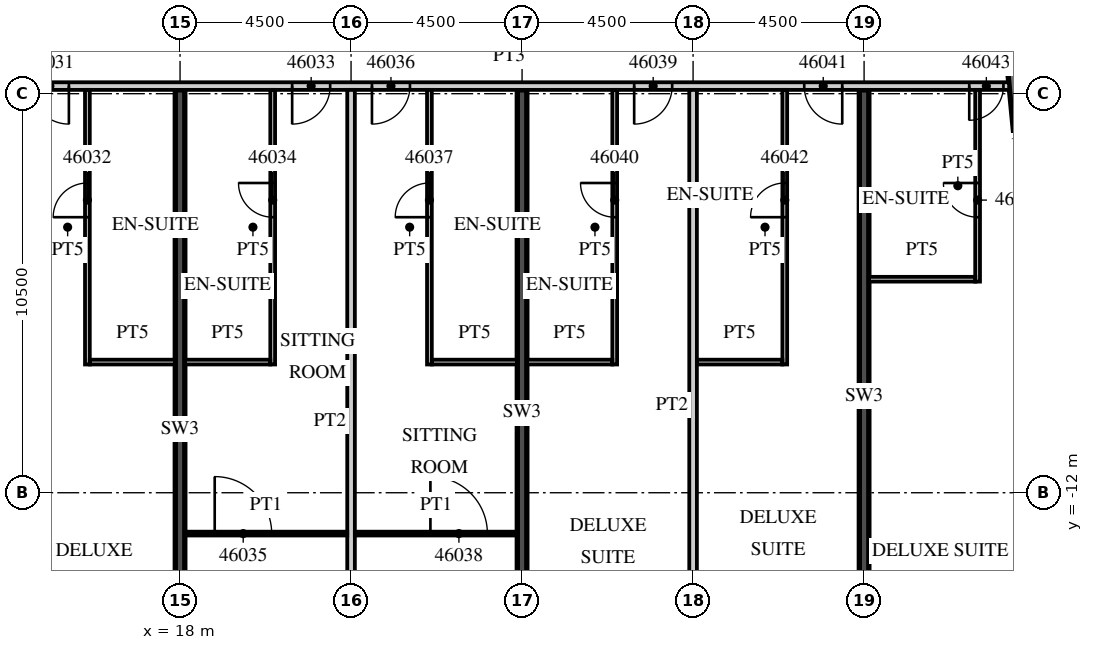
"""IFC4 building model, lengths in metres.
Left out: names, types, materials, properties, quantities, classifications, styles, units other than length and angle.
Written with IfcOpenShell. Run it as: python <this file> out.ifc"""

import sys

from ifc_helpers import new_model, si_unit, direction, frame, frame_2d, origin, place, context, subcontext, project, spatial, rectangle, extrude, element, fill, save


model = new_model("IFC4")
c1 = context("Model", 3, precision=1e-05, world=origin(), true_north=direction((0.0, 1.0)))
c2 = subcontext(c1, "Body", "Model", "MODEL_VIEW")
j1 = project(units=[si_unit("LENGTHUNIT", "METRE"), si_unit("PLANEANGLEUNIT", "RADIAN")], contexts=[c1])
p1 = place(None, origin())
s1 = spatial("IfcSite", under=j1, at=p1, CompositionType="ELEMENT")
p2 = place(p1, origin())
s2 = spatial("IfcBuilding", under=s1, at=p2, CompositionType="ELEMENT")
p3 = place(p2, frame((0.0, 0.0, 193.3)))
s3 = spatial("IfcBuildingStorey", under=s2, at=p3, CompositionType="ELEMENT", Elevation=193.3)
p4 = place(p3, frame((18.0, -19.245, 0.0), z_axis=(0.0, 0.0, 1.0), x_axis=(0.0, 1.0, 0.0)))
e1 = element("IfcWall", 1, at=p4, inside=s3, PredefinedType="SHEAR", context=c2, shape_type="SweptSolid", body=[
    extrude(rectangle(XDim=17.845, YDim=0.25, at=frame_2d((8.923, 0.0))), origin(), (0.0, 0.0, 1.0), 3.3),
])
p5 = place(p3, frame((27.0, -18.379, 0.0), z_axis=(0.0, 0.0, 1.0), x_axis=(0.0, 1.0, 0.0)))
e2 = element("IfcWall", 2, at=p5, inside=s3, PredefinedType="SHEAR", context=c2, shape_type="SweptSolid", body=[
    extrude(rectangle(XDim=16.979, YDim=0.25, at=frame_2d((8.489, 0.0))), origin(), (0.0, 0.0, 1.0), 3.3),
])
p6 = place(p3, frame((36.0, -17.512, 0.0), z_axis=(0.0, 0.0, 1.0), x_axis=(0.0, 1.0, 0.0)))
e3 = element("IfcWall", 3, at=p6, inside=s3, PredefinedType="SHEAR", context=c2, shape_type="SweptSolid", body=[
    extrude(rectangle(XDim=16.112, YDim=0.25, at=frame_2d((8.056, 0.0))), origin(), (0.0, 0.0, 1.0), 3.3),
])
p7 = place(p3, frame((41.214, -13.466, 0.0), z_axis=(0.0, 0.0, 1.0), x_axis=(-0.095847314626, 0.995396047952, 0.0)))
e4 = element("IfcWall", 4, at=p7, inside=s3, PredefinedType="SOLIDWALL", context=c2, shape_type="SweptSolid", body=[
    extrude(rectangle(XDim=34.0, YDim=0.45, at=frame_2d((17.0, 0.0))), origin(), (0.0, 0.0, 1.0), 3.02),
])
p8 = place(p7, frame((3.869, 0.0, 0.45)))
e5 = element("IfcOpeningElement", 5, at=p8, cuts=e4, PredefinedType="OPENING", context=c2, shape_type="SweptSolid", body=[
    extrude(rectangle(XDim=3.3, YDim=2.25, at=frame_2d((1.65, 1.125))), frame((0.0, 0.235, 0.0), z_axis=(0.0, -1.0, 0.0), x_axis=(1.0, 0.0, 0.0)), (0.0, 0.0, 1.0), 0.47),
])
p9 = place(p7, frame((8.39, 0.0, 0.45)))
e6 = element("IfcOpeningElement", 6, at=p9, cuts=e4, PredefinedType="OPENING", context=c2, shape_type="SweptSolid", body=[
    extrude(rectangle(XDim=3.3, YDim=2.25, at=frame_2d((1.65, 1.125))), frame((0.0, 0.235, 0.0), z_axis=(0.0, -1.0, 0.0), x_axis=(1.0, 0.0, 0.0)), (0.0, 0.0, 1.0), 0.47),
])
p10 = place(p3, frame((13.5, -1.3, 0.0), z_axis=(0.0, 0.0, 1.0), x_axis=(1.0, 0.0, 0.0)))
e7 = element("IfcWall", 7, at=p10, inside=s3, PredefinedType="PARTITIONING", context=c2, shape_type="SweptSolid", body=[
    extrude(rectangle(XDim=26.317, YDim=0.2, at=frame_2d((13.158, 0.0))), origin(), (0.0, 0.0, 1.0), 3.02),
])
p11 = place(p10, frame((0.575, 0.0, 0.0)))
e8 = element("IfcOpeningElement", 8, at=p11, cuts=e7, PredefinedType="OPENING", context=c2, shape_type="SweptSolid", body=[
    extrude(rectangle(XDim=1.0, YDim=2.1, at=frame_2d((0.5, 1.05))), frame((0.0, 0.11, 0.0), z_axis=(0.0, -1.0, 0.0), x_axis=(1.0, 0.0, 0.0)), (0.0, 0.0, 1.0), 0.22),
])
p12 = place(p10, frame((7.45, 0.0, 0.0)))
e9 = element("IfcOpeningElement", 9, at=p12, cuts=e7, PredefinedType="OPENING", context=c2, shape_type="SweptSolid", body=[
    extrude(rectangle(XDim=1.0, YDim=2.1, at=frame_2d((0.5, 1.05))), frame((0.0, 0.11, 0.0), z_axis=(0.0, -1.0, 0.0), x_axis=(1.0, 0.0, 0.0)), (0.0, 0.0, 1.0), 0.22),
])
p13 = place(p10, frame((9.55, 0.0, 0.0)))
e10 = element("IfcOpeningElement", 10, at=p13, cuts=e7, PredefinedType="OPENING", context=c2, shape_type="SweptSolid", body=[
    extrude(rectangle(XDim=1.0, YDim=2.1, at=frame_2d((0.5, 1.05))), frame((0.0, 0.11, 0.0), z_axis=(0.0, -1.0, 0.0), x_axis=(1.0, 0.0, 0.0)), (0.0, 0.0, 1.0), 0.22),
])
p14 = place(p10, frame((16.45, 0.0, 0.0)))
e11 = element("IfcOpeningElement", 11, at=p14, cuts=e7, PredefinedType="OPENING", context=c2, shape_type="SweptSolid", body=[
    extrude(rectangle(XDim=1.0, YDim=2.1, at=frame_2d((0.5, 1.05))), frame((0.0, 0.11, 0.0), z_axis=(0.0, -1.0, 0.0), x_axis=(1.0, 0.0, 0.0)), (0.0, 0.0, 1.0), 0.22),
])
p15 = place(p10, frame((20.925, 0.0, 0.0)))
e12 = element("IfcOpeningElement", 12, at=p15, cuts=e7, PredefinedType="OPENING", context=c2, shape_type="SweptSolid", body=[
    extrude(rectangle(XDim=1.0, YDim=2.1, at=frame_2d((0.5, 1.05))), frame((0.0, 0.11, 0.0), z_axis=(0.0, -1.0, 0.0), x_axis=(1.0, 0.0, 0.0)), (0.0, 0.0, 1.0), 0.22),
])
p16 = place(p10, frame((25.267, 0.0, 0.0)))
e13 = element("IfcOpeningElement", 13, at=p16, cuts=e7, PredefinedType="OPENING", context=c2, shape_type="SweptSolid", body=[
    extrude(rectangle(XDim=0.9, YDim=2.1, at=frame_2d((0.45, 1.05))), frame((0.0, 0.11, 0.0), z_axis=(0.0, -1.0, 0.0), x_axis=(1.0, 0.0, 0.0)), (0.0, 0.0, 1.0), 0.22),
])
p17 = place(p3, frame((15.562, -8.625, 0.0), z_axis=(0.0, 0.0, 1.0), x_axis=(0.0, 1.0, 0.0)))
e14 = element("IfcWall", 14, at=p17, inside=s3, PredefinedType="PARTITIONING", context=c2, shape_type="SweptSolid", body=[
    extrude(rectangle(XDim=7.225, YDim=0.125, at=frame_2d((3.613, 0.0))), origin(), (0.0, 0.0, 1.0), 3.02),
])
p18 = place(p17, frame((3.875, 0.0, 0.0)))
e15 = element("IfcOpeningElement", 15, at=p18, cuts=e14, PredefinedType="OPENING", context=c2, shape_type="SweptSolid", body=[
    extrude(rectangle(XDim=0.9, YDim=2.1, at=frame_2d((0.45, 1.05))), frame((0.0, 0.073, 0.0), z_axis=(0.0, -1.0, 0.0), x_axis=(1.0, 0.0, 0.0)), (0.0, 0.0, 1.0), 0.145),
])
p19 = place(p3, frame((15.625, -8.562, 0.0), z_axis=(0.0, 0.0, 1.0), x_axis=(1.0, 0.0, 0.0)))
e16 = element("IfcWall", 16, at=p19, inside=s3, PredefinedType="PARTITIONING", context=c2, shape_type="SweptSolid", body=[
    extrude(rectangle(XDim=2.25, YDim=0.125, at=frame_2d((1.125, 0.0))), origin(), (0.0, 0.0, 1.0), 3.02),
])
p20 = place(p3, frame((22.5, -18.834, 0.0), z_axis=(0.0, 0.0, 1.0), x_axis=(0.0, 1.0, 0.0)))
e17 = element("IfcWall", 17, at=p20, inside=s3, PredefinedType="PARTITIONING", context=c2, shape_type="SweptSolid", body=[
    extrude(rectangle(XDim=17.434, YDim=0.2, at=frame_2d((8.717, 0.0))), origin(), (0.0, 0.0, 1.0), 3.02),
])
p21 = place(p3, frame((20.438, -8.625, 0.0), z_axis=(0.0, 0.0, 1.0), x_axis=(0.0, 1.0, 0.0)))
e18 = element("IfcWall", 18, at=p21, inside=s3, PredefinedType="PARTITIONING", context=c2, shape_type="SweptSolid", body=[
    extrude(rectangle(XDim=7.225, YDim=0.125, at=frame_2d((3.613, 0.0))), origin(), (0.0, 0.0, 1.0), 3.02),
])
p22 = place(p21, frame((3.875, 0.0, 0.0)))
e19 = element("IfcOpeningElement", 19, at=p22, cuts=e18, PredefinedType="OPENING", context=c2, shape_type="SweptSolid", body=[
    extrude(rectangle(XDim=0.9, YDim=2.1, at=frame_2d((0.45, 1.05))), frame((0.0, 0.073, 0.0), z_axis=(0.0, -1.0, 0.0), x_axis=(1.0, 0.0, 0.0)), (0.0, 0.0, 1.0), 0.145),
])
p23 = place(p3, frame((18.125, -8.562, 0.0), z_axis=(0.0, 0.0, 1.0), x_axis=(1.0, 0.0, 0.0)))
e20 = element("IfcWall", 20, at=p23, inside=s3, PredefinedType="PARTITIONING", context=c2, shape_type="SweptSolid", body=[
    extrude(rectangle(XDim=2.25, YDim=0.125, at=frame_2d((1.125, 0.0))), origin(), (0.0, 0.0, 1.0), 3.02),
])
p24 = place(p3, frame((18.125, -13.075, 0.0), z_axis=(0.0, 0.0, 1.0), x_axis=(1.0, 0.0, 0.0)))
e21 = element("IfcWall", 21, at=p24, inside=s3, PredefinedType="PARTITIONING", context=c2, shape_type="SweptSolid", body=[
    extrude(rectangle(XDim=4.275, YDim=0.1, at=frame_2d((2.137, 0.0))), origin(), (0.0, 0.0, 1.0), 3.02),
])
p25 = place(p24, frame((0.787, 0.0, 0.0)))
e22 = element("IfcOpeningElement", 22, at=p25, cuts=e21, PredefinedType="OPENING", context=c2, shape_type="SweptSolid", body=[
    extrude(rectangle(XDim=1.5, YDim=2.1, at=frame_2d((0.75, 1.05))), frame((0.0, 0.06, 0.0), z_axis=(0.0, -1.0, 0.0), x_axis=(1.0, 0.0, 0.0)), (0.0, 0.0, 1.0), 0.12),
])
p26 = place(p3, frame((24.562, -8.625, 0.0), z_axis=(0.0, 0.0, 1.0), x_axis=(0.0, 1.0, 0.0)))
e23 = element("IfcWall", 23, at=p26, inside=s3, PredefinedType="PARTITIONING", context=c2, shape_type="SweptSolid", body=[
    extrude(rectangle(XDim=7.225, YDim=0.125, at=frame_2d((3.613, 0.0))), origin(), (0.0, 0.0, 1.0), 3.02),
])
p27 = place(p26, frame((3.875, 0.0, 0.0)))
e24 = element("IfcOpeningElement", 24, at=p27, cuts=e23, PredefinedType="OPENING", context=c2, shape_type="SweptSolid", body=[
    extrude(rectangle(XDim=0.9, YDim=2.1, at=frame_2d((0.45, 1.05))), frame((0.0, 0.073, 0.0), z_axis=(0.0, -1.0, 0.0), x_axis=(1.0, 0.0, 0.0)), (0.0, 0.0, 1.0), 0.145),
])
p28 = place(p3, frame((24.625, -8.562, 0.0), z_axis=(0.0, 0.0, 1.0), x_axis=(1.0, 0.0, 0.0)))
e25 = element("IfcWall", 25, at=p28, inside=s3, PredefinedType="PARTITIONING", context=c2, shape_type="SweptSolid", body=[
    extrude(rectangle(XDim=2.25, YDim=0.125, at=frame_2d((1.125, 0.0))), origin(), (0.0, 0.0, 1.0), 3.02),
])
p29 = place(p3, frame((22.6, -13.075, 0.0), z_axis=(0.0, 0.0, 1.0), x_axis=(1.0, 0.0, 0.0)))
e26 = element("IfcWall", 26, at=p29, inside=s3, PredefinedType="PARTITIONING", context=c2, shape_type="SweptSolid", body=[
    extrude(rectangle(XDim=4.275, YDim=0.1, at=frame_2d((2.137, 0.0))), origin(), (0.0, 0.0, 1.0), 3.02),
])
p30 = place(p29, frame((1.988, 0.0, 0.0)))
e27 = element("IfcOpeningElement", 27, at=p30, cuts=e26, PredefinedType="OPENING", context=c2, shape_type="SweptSolid", body=[
    extrude(rectangle(XDim=1.5, YDim=2.1, at=frame_2d((0.75, 1.05))), frame((0.0, 0.06, 0.0), z_axis=(0.0, -1.0, 0.0), x_axis=(1.0, 0.0, 0.0)), (0.0, 0.0, 1.0), 0.12),
])
p31 = place(p3, frame((31.5, -17.967, 0.0), z_axis=(0.0, 0.0, 1.0), x_axis=(0.0, 1.0, 0.0)))
e28 = element("IfcWall", 28, at=p31, inside=s3, PredefinedType="PARTITIONING", context=c2, shape_type="SweptSolid", body=[
    extrude(rectangle(XDim=16.567, YDim=0.2, at=frame_2d((8.284, 0.0))), origin(), (0.0, 0.0, 1.0), 3.02),
])
p32 = place(p3, frame((29.438, -8.625, 0.0), z_axis=(0.0, 0.0, 1.0), x_axis=(0.0, 1.0, 0.0)))
e29 = element("IfcWall", 29, at=p32, inside=s3, PredefinedType="PARTITIONING", context=c2, shape_type="SweptSolid", body=[
    extrude(rectangle(XDim=7.225, YDim=0.125, at=frame_2d((3.613, 0.0))), origin(), (0.0, 0.0, 1.0), 3.02),
])
p33 = place(p32, frame((3.875, 0.0, 0.0)))
e30 = element("IfcOpeningElement", 30, at=p33, cuts=e29, PredefinedType="OPENING", context=c2, shape_type="SweptSolid", body=[
    extrude(rectangle(XDim=0.9, YDim=2.1, at=frame_2d((0.45, 1.05))), frame((0.0, 0.073, 0.0), z_axis=(0.0, -1.0, 0.0), x_axis=(1.0, 0.0, 0.0)), (0.0, 0.0, 1.0), 0.145),
])
p34 = place(p3, frame((27.125, -8.562, 0.0), z_axis=(0.0, 0.0, 1.0), x_axis=(1.0, 0.0, 0.0)))
e31 = element("IfcWall", 31, at=p34, inside=s3, PredefinedType="PARTITIONING", context=c2, shape_type="SweptSolid", body=[
    extrude(rectangle(XDim=2.25, YDim=0.125, at=frame_2d((1.125, 0.0))), origin(), (0.0, 0.0, 1.0), 3.02),
])
p35 = place(p3, frame((33.913, -8.625, 0.0), z_axis=(0.0, 0.0, 1.0), x_axis=(0.0, 1.0, 0.0)))
e32 = element("IfcWall", 32, at=p35, inside=s3, PredefinedType="PARTITIONING", context=c2, shape_type="SweptSolid", body=[
    extrude(rectangle(XDim=7.225, YDim=0.125, at=frame_2d((3.613, 0.0))), origin(), (0.0, 0.0, 1.0), 3.02),
])
p36 = place(p35, frame((3.875, 0.0, 0.0)))
e33 = element("IfcOpeningElement", 33, at=p36, cuts=e32, PredefinedType="OPENING", context=c2, shape_type="SweptSolid", body=[
    extrude(rectangle(XDim=0.9, YDim=2.1, at=frame_2d((0.45, 1.05))), frame((0.0, 0.073, 0.0), z_axis=(0.0, -1.0, 0.0), x_axis=(1.0, 0.0, 0.0)), (0.0, 0.0, 1.0), 0.145),
])
p37 = place(p3, frame((31.6, -8.562, 0.0), z_axis=(0.0, 0.0, 1.0), x_axis=(1.0, 0.0, 0.0)))
e34 = element("IfcWall", 34, at=p37, inside=s3, PredefinedType="PARTITIONING", context=c2, shape_type="SweptSolid", body=[
    extrude(rectangle(XDim=2.25, YDim=0.125, at=frame_2d((1.125, 0.0))), origin(), (0.0, 0.0, 1.0), 3.02),
])
p38 = place(p3, frame((38.987, -6.445, 0.0), z_axis=(0.0, 0.0, 1.0), x_axis=(0.0, 1.0, 0.0)))
e35 = element("IfcWall", 35, at=p38, inside=s3, PredefinedType="PARTITIONING", context=c2, shape_type="SweptSolid", body=[
    extrude(rectangle(XDim=5.045, YDim=0.125, at=frame_2d((2.522, 0.0))), origin(), (0.0, 0.0, 1.0), 3.02),
])
p39 = place(p38, frame((1.695, 0.0, 0.0)))
e36 = element("IfcOpeningElement", 36, at=p39, cuts=e35, PredefinedType="OPENING", context=c2, shape_type="SweptSolid", body=[
    extrude(rectangle(XDim=0.9, YDim=2.1, at=frame_2d((0.45, 1.05))), frame((0.0, 0.073, 0.0), z_axis=(0.0, -1.0, 0.0), x_axis=(1.0, 0.0, 0.0)), (0.0, 0.0, 1.0), 0.145),
])
p40 = place(p3, frame((36.125, -6.382, 0.0), z_axis=(0.0, 0.0, 1.0), x_axis=(1.0, 0.0, 0.0)))
e37 = element("IfcWall", 37, at=p40, inside=s3, PredefinedType="PARTITIONING", context=c2, shape_type="SweptSolid", body=[
    extrude(rectangle(XDim=2.8, YDim=0.125, at=frame_2d((1.4, 0.0))), origin(), (0.0, 0.0, 1.0), 3.02),
])
p41 = place(p11, origin())
e38 = element("IfcDoor", 38, at=p41, inside=s3, OperationType="SINGLE_SWING_RIGHT", PredefinedType="DOOR", context=c2, shape_type="SweptSolid", body=[
    extrude(rectangle(XDim=1.0, YDim=2.1, at=frame_2d((0.5, 1.05))), frame((0.0, 0.025, 0.0), z_axis=(0.0, -1.0, 0.0), x_axis=(1.0, 0.0, 0.0)), (0.0, 0.0, 1.0), 0.05),
])
fill(e8, e38)
p42 = place(p18, origin())
e39 = element("IfcDoor", 39, at=p42, inside=s3, OperationType="SINGLE_SWING_LEFT", PredefinedType="DOOR", context=c2, shape_type="SweptSolid", body=[
    extrude(rectangle(XDim=0.9, YDim=2.1, at=frame_2d((0.45, 1.05))), frame((0.0, 0.025, 0.0), z_axis=(0.0, -1.0, 0.0), x_axis=(1.0, 0.0, 0.0)), (0.0, 0.0, 1.0), 0.05),
])
fill(e15, e39)
p43 = place(p12, origin())
e40 = element("IfcDoor", 40, at=p43, inside=s3, OperationType="SINGLE_SWING_LEFT", PredefinedType="DOOR", context=c2, shape_type="SweptSolid", body=[
    extrude(rectangle(XDim=1.0, YDim=2.1, at=frame_2d((0.5, 1.05))), frame((0.0, 0.025, 0.0), z_axis=(0.0, -1.0, 0.0), x_axis=(1.0, 0.0, 0.0)), (0.0, 0.0, 1.0), 0.05),
])
fill(e9, e40)
p44 = place(p22, origin())
e41 = element("IfcDoor", 41, at=p44, inside=s3, OperationType="SINGLE_SWING_RIGHT", PredefinedType="DOOR", context=c2, shape_type="SweptSolid", body=[
    extrude(rectangle(XDim=0.9, YDim=2.1, at=frame_2d((0.45, 1.05))), frame((0.0, 0.025, 0.0), z_axis=(0.0, -1.0, 0.0), x_axis=(1.0, 0.0, 0.0)), (0.0, 0.0, 1.0), 0.05),
])
fill(e19, e41)
p45 = place(p25, origin())
e42 = element("IfcDoor", 42, at=p45, inside=s3, OperationType="SINGLE_SWING_LEFT", PredefinedType="DOOR", context=c2, shape_type="SweptSolid", body=[
    extrude(rectangle(XDim=1.5, YDim=2.1, at=frame_2d((0.75, 1.05))), frame((0.0, 0.025, 0.0), z_axis=(0.0, -1.0, 0.0), x_axis=(1.0, 0.0, 0.0)), (0.0, 0.0, 1.0), 0.05),
])
fill(e22, e42)
p46 = place(p13, origin())
e43 = element("IfcDoor", 43, at=p46, inside=s3, OperationType="SINGLE_SWING_LEFT", PredefinedType="DOOR", context=c2, shape_type="SweptSolid", body=[
    extrude(rectangle(XDim=1.0, YDim=2.1, at=frame_2d((0.5, 1.05))), frame((0.0, 0.025, 0.0), z_axis=(0.0, -1.0, 0.0), x_axis=(1.0, 0.0, 0.0)), (0.0, 0.0, 1.0), 0.05),
])
fill(e10, e43)
p47 = place(p27, origin())
e44 = element("IfcDoor", 44, at=p47, inside=s3, OperationType="SINGLE_SWING_LEFT", PredefinedType="DOOR", context=c2, shape_type="SweptSolid", body=[
    extrude(rectangle(XDim=0.9, YDim=2.1, at=frame_2d((0.45, 1.05))), frame((0.0, 0.025, 0.0), z_axis=(0.0, -1.0, 0.0), x_axis=(1.0, 0.0, 0.0)), (0.0, 0.0, 1.0), 0.05),
])
fill(e24, e44)
p48 = place(p30, origin())
e45 = element("IfcDoor", 45, at=p48, inside=s3, OperationType="SINGLE_SWING_LEFT", PredefinedType="DOOR", context=c2, shape_type="SweptSolid", body=[
    extrude(rectangle(XDim=1.5, YDim=2.1, at=frame_2d((0.75, 1.05))), frame((0.0, 0.025, 0.0), z_axis=(0.0, -1.0, 0.0), x_axis=(1.0, 0.0, 0.0)), (0.0, 0.0, 1.0), 0.05),
])
fill(e27, e45)
p49 = place(p14, origin())
e46 = element("IfcDoor", 46, at=p49, inside=s3, OperationType="SINGLE_SWING_LEFT", PredefinedType="DOOR", context=c2, shape_type="SweptSolid", body=[
    extrude(rectangle(XDim=1.0, YDim=2.1, at=frame_2d((0.5, 1.05))), frame((0.0, 0.025, 0.0), z_axis=(0.0, -1.0, 0.0), x_axis=(1.0, 0.0, 0.0)), (0.0, 0.0, 1.0), 0.05),
])
fill(e11, e46)
p50 = place(p33, origin())
e47 = element("IfcDoor", 47, at=p50, inside=s3, OperationType="SINGLE_SWING_RIGHT", PredefinedType="DOOR", context=c2, shape_type="SweptSolid", body=[
    extrude(rectangle(XDim=0.9, YDim=2.1, at=frame_2d((0.45, 1.05))), frame((0.0, 0.025, 0.0), z_axis=(0.0, -1.0, 0.0), x_axis=(1.0, 0.0, 0.0)), (0.0, 0.0, 1.0), 0.05),
])
fill(e30, e47)
p51 = place(p15, origin())
e48 = element("IfcDoor", 48, at=p51, inside=s3, OperationType="SINGLE_SWING_RIGHT", PredefinedType="DOOR", context=c2, shape_type="SweptSolid", body=[
    extrude(rectangle(XDim=1.0, YDim=2.1, at=frame_2d((0.5, 1.05))), frame((0.0, 0.025, 0.0), z_axis=(0.0, -1.0, 0.0), x_axis=(1.0, 0.0, 0.0)), (0.0, 0.0, 1.0), 0.05),
])
fill(e12, e48)
p52 = place(p36, origin())
e49 = element("IfcDoor", 49, at=p52, inside=s3, OperationType="SINGLE_SWING_LEFT", PredefinedType="DOOR", context=c2, shape_type="SweptSolid", body=[
    extrude(rectangle(XDim=0.9, YDim=2.1, at=frame_2d((0.45, 1.05))), frame((0.0, 0.025, 0.0), z_axis=(0.0, -1.0, 0.0), x_axis=(1.0, 0.0, 0.0)), (0.0, 0.0, 1.0), 0.05),
])
fill(e33, e49)
p53 = place(p16, origin())
e50 = element("IfcDoor", 50, at=p53, inside=s3, OperationType="SINGLE_SWING_LEFT", PredefinedType="DOOR", context=c2, shape_type="SweptSolid", body=[
    extrude(rectangle(XDim=0.9, YDim=2.1, at=frame_2d((0.45, 1.05))), frame((0.0, 0.025, 0.0), z_axis=(0.0, -1.0, 0.0), x_axis=(1.0, 0.0, 0.0)), (0.0, 0.0, 1.0), 0.05),
])
fill(e13, e50)
p54 = place(p39, origin())
e51 = element("IfcDoor", 51, at=p54, inside=s3, OperationType="SINGLE_SWING_RIGHT", PredefinedType="DOOR", context=c2, shape_type="SweptSolid", body=[
    extrude(rectangle(XDim=0.9, YDim=2.1, at=frame_2d((0.45, 1.05))), frame((0.0, 0.025, 0.0), z_axis=(0.0, -1.0, 0.0), x_axis=(1.0, 0.0, 0.0)), (0.0, 0.0, 1.0), 0.05),
])
fill(e36, e51)
save(model, sys.argv[1])
